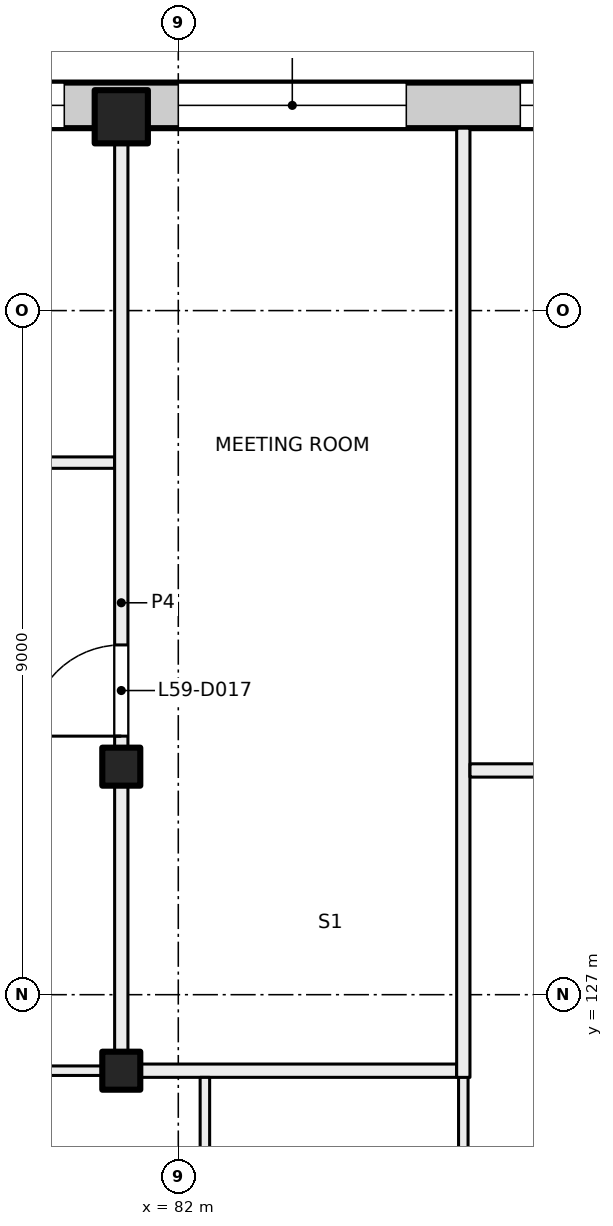
"""IFC4 building model, lengths in metres.
Left out: names, types, materials, properties, quantities, classifications, styles, units other than length and angle.
Written with IfcOpenShell. Run it as: python <this file> out.ifc"""

import sys

from ifc_helpers import new_model, si_unit, direction, frame, frame_2d, origin, origin_2d, place, context, subcontext, project, spatial, rectangle, extrude, element, fill, save


model = new_model("IFC4")
c1 = context("Model", 3, precision=1e-05, world=origin(), true_north=direction((0.0, 1.0)))
c2 = subcontext(c1, "Body", "Model", "MODEL_VIEW")
j1 = project(units=[si_unit("LENGTHUNIT", "METRE"), si_unit("PLANEANGLEUNIT", "RADIAN")], contexts=[c1])
p1 = place(None, origin())
s1 = spatial("IfcSite", under=j1, at=p1, CompositionType="ELEMENT")
p2 = place(p1, origin())
s2 = spatial("IfcBuilding", under=s1, at=p2, CompositionType="ELEMENT")
p3 = place(p2, frame((0.0, 0.0, 249.5)))
s3 = spatial("IfcBuildingStorey", under=s2, at=p3, CompositionType="ELEMENT", Elevation=249.5)
for number, where, z_axis, x_axis in (
    (1, (81.25, 130.0, 0.0), (0.0, 0.0, 1.0), (1.0, 0.0, 0.0)),
    (2, (81.25, 126.0, 0.0), (0.0, 0.0, 1.0), (1.0, 0.0, 0.0)),
):
    element("IfcColumn", number, at=place(p3, frame(where, z_axis=z_axis, x_axis=x_axis)), inside=s3, PredefinedType="COLUMN", context=c2, shape_type="SweptSolid", body=[
        extrude(rectangle(XDim=0.5, YDim=0.5, at=origin_2d()), origin(), (0.0, 0.0, 1.0), 4.0),
    ])
p4 = place(p3, frame((81.25, 138.55, 0.0), z_axis=(0.0, 0.0, 1.0), x_axis=(1.0, 0.0, 0.0)))
e3 = element("IfcColumn", 3, at=p4, inside=s3, PredefinedType="COLUMN", context=c2, shape_type="SweptSolid", body=[
    extrude(rectangle(XDim=0.7, YDim=0.7, at=origin_2d()), origin(), (0.0, 0.0, 1.0), 4.0),
])
p5 = place(p3, frame((47.07, 138.7, 0.0), z_axis=(0.0, 0.0, 1.0), x_axis=(1.0, 0.0, 0.0)))
e4 = element("IfcWall", 4, at=p5, inside=s3, PredefinedType="SOLIDWALL", context=c2, shape_type="SweptSolid", body=[
    extrude(rectangle(XDim=43.91, YDim=0.6, at=frame_2d((21.955, 0.0))), origin(), (0.0, 0.0, 1.0), 3.625),
])
p6 = place(p5, frame((3.43, 0.0, 0.9)))
e5 = element("IfcOpeningElement", 5, at=p6, cuts=e4, PredefinedType="OPENING", context=c2, shape_type="SweptSolid", body=[
    extrude(rectangle(XDim=3.0, YDim=2.4, at=frame_2d((1.5, 1.2))), frame((0.0, 0.31, 0.0), z_axis=(0.0, -1.0, 0.0), x_axis=(1.0, 0.0, 0.0)), (0.0, 0.0, 1.0), 0.62),
])
p7 = place(p5, frame((7.93, 0.0, 0.9)))
e6 = element("IfcOpeningElement", 6, at=p7, cuts=e4, PredefinedType="OPENING", context=c2, shape_type="SweptSolid", body=[
    extrude(rectangle(XDim=3.0, YDim=2.4, at=frame_2d((1.5, 1.2))), frame((0.0, 0.31, 0.0), z_axis=(0.0, -1.0, 0.0), x_axis=(1.0, 0.0, 0.0)), (0.0, 0.0, 1.0), 0.62),
])
p8 = place(p5, frame((12.43, 0.0, 0.9)))
e7 = element("IfcOpeningElement", 7, at=p8, cuts=e4, PredefinedType="OPENING", context=c2, shape_type="SweptSolid", body=[
    extrude(rectangle(XDim=3.0, YDim=2.4, at=frame_2d((1.5, 1.2))), frame((0.0, 0.31, 0.0), z_axis=(0.0, -1.0, 0.0), x_axis=(1.0, 0.0, 0.0)), (0.0, 0.0, 1.0), 0.62),
])
p9 = place(p5, frame((16.93, 0.0, 0.9)))
e8 = element("IfcOpeningElement", 8, at=p9, cuts=e4, PredefinedType="OPENING", context=c2, shape_type="SweptSolid", body=[
    extrude(rectangle(XDim=3.0, YDim=2.4, at=frame_2d((1.5, 1.2))), frame((0.0, 0.31, 0.0), z_axis=(0.0, -1.0, 0.0), x_axis=(1.0, 0.0, 0.0)), (0.0, 0.0, 1.0), 0.62),
])
p10 = place(p5, frame((21.43, 0.0, 0.9)))
e9 = element("IfcOpeningElement", 9, at=p10, cuts=e4, PredefinedType="OPENING", context=c2, shape_type="SweptSolid", body=[
    extrude(rectangle(XDim=3.0, YDim=2.4, at=frame_2d((1.5, 1.2))), frame((0.0, 0.31, 0.0), z_axis=(0.0, -1.0, 0.0), x_axis=(1.0, 0.0, 0.0)), (0.0, 0.0, 1.0), 0.62),
])
p11 = place(p5, frame((25.93, 0.0, 0.9)))
e10 = element("IfcOpeningElement", 10, at=p11, cuts=e4, PredefinedType="OPENING", context=c2, shape_type="SweptSolid", body=[
    extrude(rectangle(XDim=3.0, YDim=2.4, at=frame_2d((1.5, 1.2))), frame((0.0, 0.31, 0.0), z_axis=(0.0, -1.0, 0.0), x_axis=(1.0, 0.0, 0.0)), (0.0, 0.0, 1.0), 0.62),
])
p12 = place(p5, frame((30.43, 0.0, 0.9)))
e11 = element("IfcOpeningElement", 11, at=p12, cuts=e4, PredefinedType="OPENING", context=c2, shape_type="SweptSolid", body=[
    extrude(rectangle(XDim=3.0, YDim=2.4, at=frame_2d((1.5, 1.2))), frame((0.0, 0.31, 0.0), z_axis=(0.0, -1.0, 0.0), x_axis=(1.0, 0.0, 0.0)), (0.0, 0.0, 1.0), 0.62),
])
p13 = place(p5, frame((34.93, 0.0, 0.9)))
e12 = element("IfcOpeningElement", 12, at=p13, cuts=e4, PredefinedType="OPENING", context=c2, shape_type="SweptSolid", body=[
    extrude(rectangle(XDim=3.0, YDim=2.4, at=frame_2d((1.5, 1.2))), frame((0.0, 0.31, 0.0), z_axis=(0.0, -1.0, 0.0), x_axis=(1.0, 0.0, 0.0)), (0.0, 0.0, 1.0), 0.62),
])
p14 = place(p5, frame((39.43, 0.0, 0.9)))
e13 = element("IfcOpeningElement", 13, at=p14, cuts=e4, PredefinedType="OPENING", context=c2, shape_type="SweptSolid", body=[
    extrude(rectangle(XDim=3.0, YDim=2.4, at=frame_2d((1.5, 1.2))), frame((0.0, 0.31, 0.0), z_axis=(0.0, -1.0, 0.0), x_axis=(1.0, 0.0, 0.0)), (0.0, 0.0, 1.0), 0.62),
])
p15 = place(p3, frame((81.162, 134.0, 0.0), z_axis=(0.0, 0.0, 1.0), x_axis=(-1.0, 0.0, 0.0)))
e14 = element("IfcWall", 14, at=p15, inside=s3, PredefinedType="PARTITIONING", context=c2, shape_type="SweptSolid", body=[
    extrude(rectangle(XDim=8.837, YDim=0.15, at=frame_2d((4.418, 0.0))), origin(), (0.0, 0.0, 1.0), 3.625),
])
p16 = place(p15, frame((1.696, 0.0, 0.0)))
e15 = element("IfcOpeningElement", 15, at=p16, cuts=e14, PredefinedType="OPENING", context=c2, shape_type="SweptSolid", body=[
    extrude(rectangle(XDim=1.0, YDim=2.1, at=frame_2d((0.5, 1.05))), frame((0.0, 0.085, 0.0), z_axis=(0.0, -1.0, 0.0), x_axis=(1.0, 0.0, 0.0)), (0.0, 0.0, 1.0), 0.17),
])
p17 = place(p15, frame((6.135, 0.0, 0.0)))
e16 = element("IfcOpeningElement", 16, at=p17, cuts=e14, PredefinedType="OPENING", context=c2, shape_type="SweptSolid", body=[
    extrude(rectangle(XDim=1.0, YDim=2.1, at=frame_2d((0.5, 1.05))), frame((0.0, 0.085, 0.0), z_axis=(0.0, -1.0, 0.0), x_axis=(1.0, 0.0, 0.0)), (0.0, 0.0, 1.0), 0.17),
])
p18 = place(p3, frame((76.812, 126.0, 0.0), z_axis=(0.0, 0.0, 1.0), x_axis=(1.0, 0.0, 0.0)))
e17 = element("IfcWall", 17, at=p18, inside=s3, PredefinedType="PARTITIONING", context=c2, shape_type="SweptSolid", body=[
    extrude(rectangle(XDim=4.441, YDim=0.125, at=frame_2d((2.22, 0.0))), origin(), (0.0, 0.0, 1.0), 3.625),
])
p19 = place(p3, frame((81.338, 126.0, 0.0), z_axis=(0.0, 0.0, 1.0), x_axis=(1.0, 0.0, 0.0)))
e18 = element("IfcWall", 18, at=p19, inside=s3, PredefinedType="PARTITIONING", context=c2, shape_type="SweptSolid", body=[
    extrude(rectangle(XDim=4.324, YDim=0.175, at=frame_2d((2.162, 0.0))), origin(), (0.0, 0.0, 1.0), 3.625),
])
p20 = place(p3, frame((81.25, 125.912, 0.0), z_axis=(0.0, 0.0, 1.0), x_axis=(0.0, 1.0, 0.0)))
e19 = element("IfcWall", 19, at=p20, inside=s3, PredefinedType="PARTITIONING", context=c2, shape_type="SweptSolid", body=[
    extrude(rectangle(XDim=12.488, YDim=0.175, at=frame_2d((6.244, 0.0))), origin(), (0.0, 0.0, 1.0), 3.625),
])
p21 = place(p20, frame((4.49, 0.0, 0.0)))
e20 = element("IfcOpeningElement", 20, at=p21, cuts=e19, PredefinedType="OPENING", context=c2, shape_type="SweptSolid", body=[
    extrude(rectangle(XDim=1.2, YDim=2.1, at=frame_2d((0.6, 1.05))), frame((0.0, 0.097, 0.0), z_axis=(0.0, -1.0, 0.0), x_axis=(1.0, 0.0, 0.0)), (0.0, 0.0, 1.0), 0.195),
])
p22 = place(p3, frame((82.35, 125.912, 0.0), z_axis=(0.0, 0.0, 1.0), x_axis=(0.0, -1.0, 0.0)))
e21 = element("IfcWall", 21, at=p22, inside=s3, PredefinedType="PARTITIONING", context=c2, shape_type="SweptSolid", body=[
    extrude(rectangle(XDim=2.8, YDim=0.125, at=frame_2d((1.4, 0.0))), origin(), (0.0, 0.0, 1.0), 3.625),
])
p23 = place(p3, frame((85.75, 121.5, 0.0), z_axis=(0.0, 0.0, 1.0), x_axis=(0.0, 1.0, 0.0)))
e22 = element("IfcWall", 22, at=p23, inside=s3, PredefinedType="PARTITIONING", context=c2, shape_type="SweptSolid", body=[
    extrude(rectangle(XDim=4.503, YDim=0.125, at=frame_2d((2.251, 0.0))), origin(), (0.0, 0.0, 1.0), 3.625),
])
p24 = place(p3, frame((85.75, 125.912, 0.0), z_axis=(0.0, 0.0, 1.0), x_axis=(0.0, 1.0, 0.0)))
e23 = element("IfcWall", 23, at=p24, inside=s3, PredefinedType="PARTITIONING", context=c2, shape_type="SweptSolid", body=[
    extrude(rectangle(XDim=12.488, YDim=0.175, at=frame_2d((6.244, 0.0))), origin(), (0.0, 0.0, 1.0), 3.625),
])
p25 = place(p3, frame((85.838, 129.95, 0.0), z_axis=(0.0, 0.0, 1.0), x_axis=(1.0, 0.0, 0.0)))
e24 = element("IfcWall", 24, at=p25, inside=s3, PredefinedType="PARTITIONING", context=c2, shape_type="SweptSolid", body=[
    extrude(rectangle(XDim=5.162, YDim=0.175, at=frame_2d((2.581, 0.0))), origin(), (0.0, 0.0, 1.0), 3.625),
])
p26 = place(p25, frame((1.971, 0.0, 0.0)))
e25 = element("IfcOpeningElement", 25, at=p26, cuts=e24, PredefinedType="OPENING", context=c2, shape_type="SweptSolid", body=[
    extrude(rectangle(XDim=1.2, YDim=2.1, at=frame_2d((0.6, 1.05))), frame((0.0, 0.097, 0.0), z_axis=(0.0, -1.0, 0.0), x_axis=(1.0, 0.0, 0.0)), (0.0, 0.0, 1.0), 0.195),
])
p27 = place(p12, origin())
e26 = element("IfcWindow", 26, at=p27, inside=s3, PartitioningType="SINGLE_PANEL", PredefinedType="WINDOW", context=c2, shape_type="SweptSolid", body=[
    extrude(rectangle(XDim=3.0, YDim=2.4, at=frame_2d((1.5, 1.2))), frame((0.0, 0.03, 0.0), z_axis=(0.0, -1.0, 0.0), x_axis=(1.0, 0.0, 0.0)), (0.0, 0.0, 1.0), 0.06),
])
fill(e11, e26)
p28 = place(p13, origin())
e27 = element("IfcWindow", 27, at=p28, inside=s3, PartitioningType="SINGLE_PANEL", PredefinedType="WINDOW", context=c2, shape_type="SweptSolid", body=[
    extrude(rectangle(XDim=3.0, YDim=2.4, at=frame_2d((1.5, 1.2))), frame((0.0, 0.03, 0.0), z_axis=(0.0, -1.0, 0.0), x_axis=(1.0, 0.0, 0.0)), (0.0, 0.0, 1.0), 0.06),
])
fill(e12, e27)
p29 = place(p14, origin())
e28 = element("IfcWindow", 28, at=p29, inside=s3, PartitioningType="SINGLE_PANEL", PredefinedType="WINDOW", context=c2, shape_type="SweptSolid", body=[
    extrude(rectangle(XDim=3.0, YDim=2.4, at=frame_2d((1.5, 1.2))), frame((0.0, 0.03, 0.0), z_axis=(0.0, -1.0, 0.0), x_axis=(1.0, 0.0, 0.0)), (0.0, 0.0, 1.0), 0.06),
])
fill(e13, e28)
p30 = place(p21, origin())
e29 = element("IfcDoor", 29, at=p30, inside=s3, OperationType="DOUBLE_DOOR_SINGLE_SWING", PredefinedType="DOOR", context=c2, shape_type="SweptSolid", body=[
    extrude(rectangle(XDim=1.2, YDim=2.1, at=frame_2d((0.6, 1.05))), frame((0.0, 0.025, 0.0), z_axis=(0.0, -1.0, 0.0), x_axis=(1.0, 0.0, 0.0)), (0.0, 0.0, 1.0), 0.05),
])
fill(e20, e29)
save(model, sys.argv[1])
